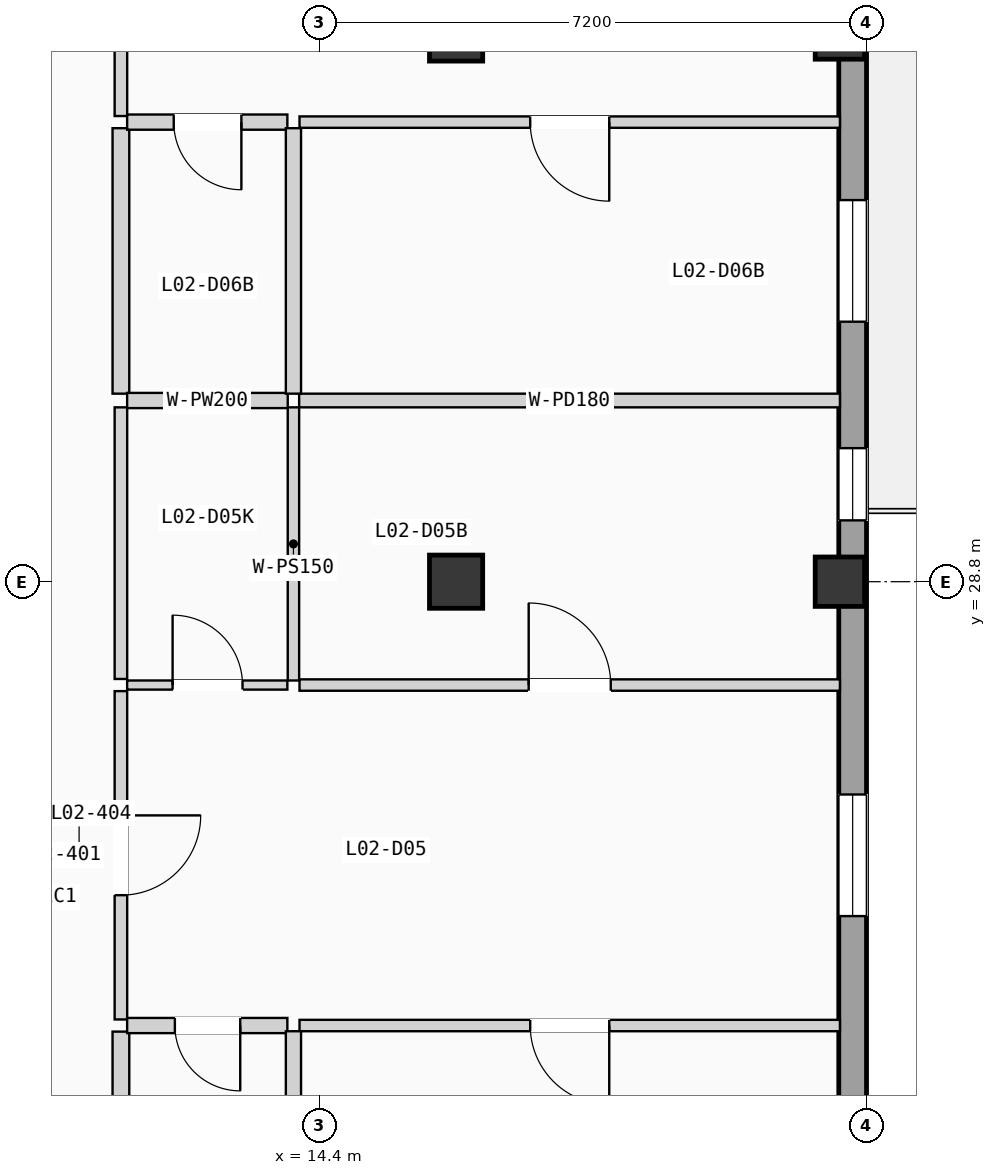
"""IFC4 building model, lengths in metres.
Left out: names, types, materials, properties, quantities, classifications, styles, units other than length and angle.
Written with IfcOpenShell. Run it as: python <this file> out.ifc"""

import sys

from ifc_helpers import new_model, si_unit, direction, frame, frame_2d, origin, origin_2d, place, context, subcontext, project, spatial, rectangle, extrude, element, fill, save


model = new_model("IFC4")
c1 = context("Model", 3, precision=1e-05, world=origin(), true_north=direction((0.0, 1.0)))
c2 = subcontext(c1, "Body", "Model", "MODEL_VIEW")
j1 = project(units=[si_unit("LENGTHUNIT", "METRE"), si_unit("PLANEANGLEUNIT", "RADIAN")], contexts=[c1])
p1 = place(None, origin())
s1 = spatial("IfcSite", under=j1, at=p1, CompositionType="ELEMENT")
p2 = place(p1, origin())
s2 = spatial("IfcBuilding", under=s1, at=p2, CompositionType="ELEMENT")
p3 = place(p2, frame((0.0, 0.0, 8.575)))
s3 = spatial("IfcBuildingStorey", under=s2, at=p3, CompositionType="ELEMENT", Elevation=8.575)
for number, where, z_axis, x_axis in (
    (1, (16.2, 28.8, 0.0), (0.0, 0.0, 1.0), (1.0, 0.0, 0.0)),
    (2, (16.2, 36.0, 0.0), (0.0, 0.0, 1.0), (1.0, 0.0, 0.0)),
):
    element("IfcColumn", number, at=place(p3, frame(where, z_axis=z_axis, x_axis=x_axis)), inside=s3, PredefinedType="COLUMN", context=c2, shape_type="SweptSolid", body=[
        extrude(rectangle(XDim=0.7, YDim=0.7, at=origin_2d()), origin(), (0.0, 0.0, 1.0), 3.5),
    ])
for number, where, z_axis, x_axis in (
    (3, (21.25, 28.8, 0.0), (0.0, 0.0, 1.0), (1.0, 0.0, 0.0)),
    (4, (21.25, 36.0, 0.0), (0.0, 0.0, 1.0), (1.0, 0.0, 0.0)),
):
    element("IfcColumn", number, at=place(p3, frame(where, z_axis=z_axis, x_axis=x_axis)), inside=s3, PredefinedType="COLUMN", context=c2, shape_type="SweptSolid", body=[
        extrude(rectangle(XDim=0.65, YDim=0.65, at=origin_2d()), origin(), (0.0, 0.0, 1.0), 3.5),
    ])
p4 = place(p3, frame((21.417, 0.365, 0.0), z_axis=(0.0, 0.0, 1.0), x_axis=(0.0, 1.0, 0.0)))
e5 = element("IfcWall", 5, at=p4, inside=s3, PredefinedType="SOLIDWALL", context=c2, shape_type="SweptSolid", body=[
    extrude(rectangle(XDim=49.67, YDim=0.365, at=frame_2d((24.835, 0.0))), origin(), (0.0, 0.0, 1.0), 3.24),
])
p5 = place(p4, frame((11.436, 0.0, 0.0)))
e6 = element("IfcOpeningElement", 6, at=p5, cuts=e5, PredefinedType="OPENING", context=c2, shape_type="SweptSolid", body=[
    extrude(rectangle(XDim=0.95, YDim=2.15, at=frame_2d((0.475, 1.075))), frame((0.0, 0.192, 0.0), z_axis=(0.0, -1.0, 0.0), x_axis=(1.0, 0.0, 0.0)), (0.0, 0.0, 1.0), 0.385),
])
p6 = place(p4, frame((8.241, 0.0, 0.9)))
e7 = element("IfcOpeningElement", 7, at=p6, cuts=e5, PredefinedType="OPENING", context=c2, shape_type="SweptSolid", body=[
    extrude(rectangle(XDim=1.48, YDim=1.65, at=frame_2d((0.74, 0.825))), frame((0.0, 0.192, 0.0), z_axis=(0.0, -1.0, 0.0), x_axis=(1.0, 0.0, 0.0)), (0.0, 0.0, 1.0), 0.385),
])
p7 = place(p4, frame((16.275, 0.0, 0.755)))
e8 = element("IfcOpeningElement", 8, at=p7, cuts=e5, PredefinedType="OPENING", context=c2, shape_type="SweptSolid", body=[
    extrude(rectangle(XDim=1.48, YDim=1.8, at=frame_2d((0.74, 0.9))), frame((0.0, 0.192, 0.0), z_axis=(0.0, -1.0, 0.0), x_axis=(1.0, 0.0, 0.0)), (0.0, 0.0, 1.0), 0.385),
])
p8 = place(p4, frame((24.035, 0.0, 0.9)))
e9 = element("IfcOpeningElement", 9, at=p8, cuts=e5, PredefinedType="OPENING", context=c2, shape_type="SweptSolid", body=[
    extrude(rectangle(XDim=1.6, YDim=1.2, at=frame_2d((0.8, 0.6))), frame((0.0, 0.192, 0.0), z_axis=(0.0, -1.0, 0.0), x_axis=(1.0, 0.0, 0.0)), (0.0, 0.0, 1.0), 0.385),
])
p9 = place(p4, frame((19.478, 0.0, 0.85)))
e10 = element("IfcOpeningElement", 10, at=p9, cuts=e5, PredefinedType="OPENING", context=c2, shape_type="SweptSolid", body=[
    extrude(rectangle(XDim=0.95, YDim=1.2, at=frame_2d((0.475, 0.6))), frame((0.0, 0.192, 0.0), z_axis=(0.0, -1.0, 0.0), x_axis=(1.0, 0.0, 0.0)), (0.0, 0.0, 1.0), 0.385),
])
p10 = place(p4, frame((29.242, 0.0, 0.85)))
e11 = element("IfcOpeningElement", 11, at=p10, cuts=e5, PredefinedType="OPENING", context=c2, shape_type="SweptSolid", body=[
    extrude(rectangle(XDim=0.95, YDim=1.2, at=frame_2d((0.475, 0.6))), frame((0.0, 0.192, 0.0), z_axis=(0.0, -1.0, 0.0), x_axis=(1.0, 0.0, 0.0)), (0.0, 0.0, 1.0), 0.385),
])
p11 = place(p4, frame((37.218, 0.0, 0.0)))
e12 = element("IfcOpeningElement", 12, at=p11, cuts=e5, PredefinedType="OPENING", context=c2, shape_type="SweptSolid", body=[
    extrude(rectangle(XDim=1.08, YDim=2.18, at=frame_2d((0.54, 1.09))), frame((0.0, 0.192, 0.0), z_axis=(0.0, -1.0, 0.0), x_axis=(1.0, 0.0, 0.0)), (0.0, 0.0, 1.0), 0.385),
])
p12 = place(p4, frame((31.856, 0.0, 0.9)))
e13 = element("IfcOpeningElement", 13, at=p12, cuts=e5, PredefinedType="OPENING", context=c2, shape_type="SweptSolid", body=[
    extrude(rectangle(XDim=1.6, YDim=1.65, at=frame_2d((0.8, 0.825))), frame((0.0, 0.192, 0.0), z_axis=(0.0, -1.0, 0.0), x_axis=(1.0, 0.0, 0.0)), (0.0, 0.0, 1.0), 0.385),
])
p13 = place(p4, frame((39.889, 0.0, 0.755)))
e14 = element("IfcOpeningElement", 14, at=p13, cuts=e5, PredefinedType="OPENING", context=c2, shape_type="SweptSolid", body=[
    extrude(rectangle(XDim=1.6, YDim=1.8, at=frame_2d((0.8, 0.9))), frame((0.0, 0.192, 0.0), z_axis=(0.0, -1.0, 0.0), x_axis=(1.0, 0.0, 0.0)), (0.0, 0.0, 1.0), 0.385),
])
p14 = place(p3, frame((11.79, 23.04, 0.0), z_axis=(0.0, 0.0, 1.0), x_axis=(0.0, 1.0, 0.0)))
e15 = element("IfcWall", 15, at=p14, inside=s3, PredefinedType="PARTITIONING", context=c2, shape_type="SweptSolid", body=[
    extrude(rectangle(XDim=4.32, YDim=0.165, at=frame_2d((2.16, 0.0))), origin(), (0.0, 0.0, 1.0), 3.22),
])
p15 = place(p14, frame((1.635, 0.0, 0.0)))
e16 = element("IfcOpeningElement", 16, at=p15, cuts=e15, PredefinedType="OPENING", context=c2, shape_type="SweptSolid", body=[
    extrude(rectangle(XDim=1.05, YDim=2.13, at=frame_2d((0.525, 1.065))), frame((0.0, 0.093, 0.0), z_axis=(0.0, -1.0, 0.0), x_axis=(1.0, 0.0, 0.0)), (0.0, 0.0, 1.0), 0.185),
])
p16 = place(p3, frame((11.79, 19.306, 0.0), z_axis=(0.0, 0.0, 1.0), x_axis=(0.0, 1.0, 0.0)))
e17 = element("IfcWall", 17, at=p16, inside=s3, PredefinedType="PLUMBINGWALL", context=c2, shape_type="SweptSolid", body=[
    extrude(rectangle(XDim=3.574, YDim=0.22, at=frame_2d((1.787, 0.0))), origin(), (0.0, 0.0, 1.0), 3.22),
])
p17 = place(p3, frame((11.79, 27.52, 0.0), z_axis=(0.0, 0.0, 1.0), x_axis=(0.0, 1.0, 0.0)))
e18 = element("IfcWall", 18, at=p17, inside=s3, PredefinedType="PARTITIONING", context=c2, shape_type="SweptSolid", body=[
    extrude(rectangle(XDim=3.574, YDim=0.165, at=frame_2d((1.787, 0.0))), origin(), (0.0, 0.0, 1.0), 3.22),
])
p18 = place(p3, frame((11.79, 34.927, 0.0), z_axis=(0.0, 0.0, 1.0), x_axis=(0.0, 1.0, 0.0)))
e19 = element("IfcWall", 19, at=p18, inside=s3, PredefinedType="PARTITIONING", context=c2, shape_type="SweptSolid", body=[
    extrude(rectangle(XDim=4.22, YDim=0.165, at=frame_2d((2.11, 0.0))), origin(), (0.0, 0.0, 1.0), 3.22),
])
p19 = place(p18, frame((1.585, 0.0, 0.0)))
e20 = element("IfcOpeningElement", 20, at=p19, cuts=e19, PredefinedType="OPENING", context=c2, shape_type="SweptSolid", body=[
    extrude(rectangle(XDim=1.05, YDim=2.13, at=frame_2d((0.525, 1.065))), frame((0.0, 0.093, 0.0), z_axis=(0.0, -1.0, 0.0), x_axis=(1.0, 0.0, 0.0)), (0.0, 0.0, 1.0), 0.185),
])
p20 = place(p3, frame((11.79, 31.274, 0.0), z_axis=(0.0, 0.0, 1.0), x_axis=(0.0, 1.0, 0.0)))
e21 = element("IfcWall", 21, at=p20, inside=s3, PredefinedType="PLUMBINGWALL", context=c2, shape_type="SweptSolid", body=[
    extrude(rectangle(XDim=3.493, YDim=0.22, at=frame_2d((1.747, 0.0))), origin(), (0.0, 0.0, 1.0), 3.22),
])
p21 = place(p3, frame((11.872, 22.96, 0.0), z_axis=(0.0, 0.0, 1.0), x_axis=(1.0, 0.0, 0.0)))
e22 = element("IfcWall", 22, at=p21, inside=s3, PredefinedType="PLUMBINGWALL", context=c2, shape_type="SweptSolid", body=[
    extrude(rectangle(XDim=2.108, YDim=0.2, at=frame_2d((1.054, 0.0))), origin(), (0.0, 0.0, 1.0), 3.22),
])
p22 = place(p21, frame((0.628, 0.0, 0.0)))
e23 = element("IfcOpeningElement", 23, at=p22, cuts=e22, PredefinedType="OPENING", context=c2, shape_type="SweptSolid", body=[
    extrude(rectangle(XDim=0.86, YDim=2.0, at=frame_2d((0.43, 1.0))), frame((0.0, 0.11, 0.0), z_axis=(0.0, -1.0, 0.0), x_axis=(1.0, 0.0, 0.0)), (0.0, 0.0, 1.0), 0.22),
])
p23 = place(p3, frame((11.872, 27.44, 0.0), z_axis=(0.0, 0.0, 1.0), x_axis=(1.0, 0.0, 0.0)))
e24 = element("IfcWall", 24, at=p23, inside=s3, PredefinedType="PARTITIONING", context=c2, shape_type="SweptSolid", body=[
    extrude(rectangle(XDim=2.108, YDim=0.12, at=frame_2d((1.054, 0.0))), origin(), (0.0, 0.0, 1.0), 3.22),
])
p24 = place(p23, frame((0.598, 0.0, 0.0)))
e25 = element("IfcOpeningElement", 25, at=p24, cuts=e24, PredefinedType="OPENING", context=c2, shape_type="SweptSolid", body=[
    extrude(rectangle(XDim=0.92, YDim=2.02, at=frame_2d((0.46, 1.01))), frame((0.0, 0.07, 0.0), z_axis=(0.0, -1.0, 0.0), x_axis=(1.0, 0.0, 0.0)), (0.0, 0.0, 1.0), 0.14),
])
p25 = place(p3, frame((14.14, 22.96, 0.0), z_axis=(0.0, 0.0, 1.0), x_axis=(1.0, 0.0, 0.0)))
e26 = element("IfcWall", 26, at=p25, inside=s3, PredefinedType="PARTITIONING", context=c2, shape_type="SweptSolid", body=[
    extrude(rectangle(XDim=7.11, YDim=0.15, at=frame_2d((3.555, 0.0))), origin(), (0.0, 0.0, 1.0), 3.22),
])
p26 = place(p25, frame((3.035, 0.0, 0.0)))
e27 = element("IfcOpeningElement", 27, at=p26, cuts=e26, PredefinedType="OPENING", context=c2, shape_type="SweptSolid", body=[
    extrude(rectangle(XDim=1.04, YDim=2.08, at=frame_2d((0.52, 1.04))), frame((0.0, 0.085, 0.0), z_axis=(0.0, -1.0, 0.0), x_axis=(1.0, 0.0, 0.0)), (0.0, 0.0, 1.0), 0.17),
])
p27 = place(p3, frame((14.14, 27.44, 0.0), z_axis=(0.0, 0.0, 1.0), x_axis=(1.0, 0.0, 0.0)))
e28 = element("IfcWall", 28, at=p27, inside=s3, PredefinedType="PARTITIONING", context=c2, shape_type="SweptSolid", body=[
    extrude(rectangle(XDim=7.11, YDim=0.15, at=frame_2d((3.555, 0.0))), origin(), (0.0, 0.0, 1.0), 3.22),
])
p28 = place(p27, frame((3.015, 0.0, 0.0)))
e29 = element("IfcOpeningElement", 29, at=p28, cuts=e28, PredefinedType="OPENING", context=c2, shape_type="SweptSolid", body=[
    extrude(rectangle(XDim=1.08, YDim=2.1, at=frame_2d((0.54, 1.05))), frame((0.0, 0.085, 0.0), z_axis=(0.0, -1.0, 0.0), x_axis=(1.0, 0.0, 0.0)), (0.0, 0.0, 1.0), 0.17),
])
p29 = place(p3, frame((14.06, 19.306, 0.0), z_axis=(0.0, 0.0, 1.0), x_axis=(0.0, 1.0, 0.0)))
e30 = element("IfcWall", 30, at=p29, inside=s3, PredefinedType="PLUMBINGWALL", context=c2, shape_type="SweptSolid", body=[
    extrude(rectangle(XDim=3.579, YDim=0.2, at=frame_2d((1.79, 0.0))), origin(), (0.0, 0.0, 1.0), 3.22),
])
p30 = place(p3, frame((14.06, 27.5, 0.0), z_axis=(0.0, 0.0, 1.0), x_axis=(0.0, 1.0, 0.0)))
e31 = element("IfcWall", 31, at=p30, inside=s3, PredefinedType="PARTITIONING", context=c2, shape_type="SweptSolid", body=[
    extrude(rectangle(XDim=3.594, YDim=0.15, at=frame_2d((1.797, 0.0))), origin(), (0.0, 0.0, 1.0), 3.22),
])
p31 = place(p3, frame((11.872, 31.184, 0.0), z_axis=(0.0, 0.0, 1.0), x_axis=(1.0, 0.0, 0.0)))
e32 = element("IfcWall", 32, at=p31, inside=s3, PredefinedType="PLUMBINGWALL", context=c2, shape_type="SweptSolid", body=[
    extrude(rectangle(XDim=2.113, YDim=0.2, at=frame_2d((1.057, 0.0))), origin(), (0.0, 0.0, 1.0), 3.22),
])
p32 = place(p3, frame((14.135, 31.184, 0.0), z_axis=(0.0, 0.0, 1.0), x_axis=(1.0, 0.0, 0.0)))
e33 = element("IfcWall", 33, at=p32, inside=s3, PredefinedType="PARTITIONING", context=c2, shape_type="SweptSolid", body=[
    extrude(rectangle(XDim=7.115, YDim=0.18, at=frame_2d((3.558, 0.0))), origin(), (0.0, 0.0, 1.0), 3.22),
])
p33 = place(p3, frame((11.872, 34.847, 0.0), z_axis=(0.0, 0.0, 1.0), x_axis=(1.0, 0.0, 0.0)))
e34 = element("IfcWall", 34, at=p33, inside=s3, PredefinedType="PLUMBINGWALL", context=c2, shape_type="SweptSolid", body=[
    extrude(rectangle(XDim=2.108, YDim=0.2, at=frame_2d((1.054, 0.0))), origin(), (0.0, 0.0, 1.0), 3.22),
])
p34 = place(p33, frame((0.613, 0.0, 0.0)))
e35 = element("IfcOpeningElement", 35, at=p34, cuts=e34, PredefinedType="OPENING", context=c2, shape_type="SweptSolid", body=[
    extrude(rectangle(XDim=0.89, YDim=2.03, at=frame_2d((0.445, 1.015))), frame((0.0, 0.11, 0.0), z_axis=(0.0, -1.0, 0.0), x_axis=(1.0, 0.0, 0.0)), (0.0, 0.0, 1.0), 0.22),
])
p35 = place(p3, frame((14.14, 34.847, 0.0), z_axis=(0.0, 0.0, 1.0), x_axis=(1.0, 0.0, 0.0)))
e36 = element("IfcWall", 36, at=p35, inside=s3, PredefinedType="PARTITIONING", context=c2, shape_type="SweptSolid", body=[
    extrude(rectangle(XDim=7.11, YDim=0.15, at=frame_2d((3.555, 0.0))), origin(), (0.0, 0.0, 1.0), 3.22),
])
p36 = place(p35, frame((3.035, 0.0, 0.0)))
e37 = element("IfcOpeningElement", 37, at=p36, cuts=e36, PredefinedType="OPENING", context=c2, shape_type="SweptSolid", body=[
    extrude(rectangle(XDim=1.04, YDim=2.08, at=frame_2d((0.52, 1.04))), frame((0.0, 0.085, 0.0), z_axis=(0.0, -1.0, 0.0), x_axis=(1.0, 0.0, 0.0)), (0.0, 0.0, 1.0), 0.17),
])
p37 = place(p3, frame((14.06, 31.274, 0.0), z_axis=(0.0, 0.0, 1.0), x_axis=(0.0, 1.0, 0.0)))
e38 = element("IfcWall", 38, at=p37, inside=s3, PredefinedType="PLUMBINGWALL", context=c2, shape_type="SweptSolid", body=[
    extrude(rectangle(XDim=3.493, YDim=0.2, at=frame_2d((1.747, 0.0))), origin(), (0.0, 0.0, 1.0), 3.22),
])
p38 = place(p8, origin())
e39 = element("IfcWindow", 39, at=p38, inside=s3, PartitioningType="DOUBLE_PANEL_VERTICAL", PredefinedType="WINDOW", context=c2, shape_type="SweptSolid", body=[
    extrude(rectangle(XDim=1.6, YDim=1.2, at=frame_2d((0.8, 0.6))), frame((0.0, 0.03, 0.0), z_axis=(0.0, -1.0, 0.0), x_axis=(1.0, 0.0, 0.0)), (0.0, 0.0, 1.0), 0.06),
])
fill(e9, e39)
p39 = place(p10, origin())
e40 = element("IfcWindow", 40, at=p39, inside=s3, PartitioningType="SINGLE_PANEL", PredefinedType="WINDOW", context=c2, shape_type="SweptSolid", body=[
    extrude(rectangle(XDim=0.95, YDim=1.2, at=frame_2d((0.475, 0.6))), frame((0.0, 0.03, 0.0), z_axis=(0.0, -1.0, 0.0), x_axis=(1.0, 0.0, 0.0)), (0.0, 0.0, 1.0), 0.06),
])
fill(e11, e40)
p40 = place(p12, origin())
e41 = element("IfcWindow", 41, at=p40, inside=s3, PartitioningType="DOUBLE_PANEL_VERTICAL", PredefinedType="WINDOW", context=c2, shape_type="SweptSolid", body=[
    extrude(rectangle(XDim=1.6, YDim=1.65, at=frame_2d((0.8, 0.825))), frame((0.0, 0.03, 0.0), z_axis=(0.0, -1.0, 0.0), x_axis=(1.0, 0.0, 0.0)), (0.0, 0.0, 1.0), 0.06),
])
fill(e13, e41)
p41 = place(p15, frame((1.05, 0.0, 0.0), z_axis=(0.0, 0.0, 1.0), x_axis=(-1.0, 0.0, 0.0)))
e42 = element("IfcDoor", 42, at=p41, inside=s3, OperationType="SINGLE_SWING_RIGHT", PredefinedType="DOOR", context=c2, shape_type="SweptSolid", body=[
    extrude(rectangle(XDim=1.05, YDim=2.13, at=frame_2d((0.525, 1.065))), frame((0.0, 0.025, 0.0), z_axis=(0.0, -1.0, 0.0), x_axis=(1.0, 0.0, 0.0)), (0.0, 0.0, 1.0), 0.05),
])
fill(e16, e42)
p42 = place(p22, frame((0.86, 0.0, 0.0), z_axis=(0.0, 0.0, 1.0), x_axis=(-1.0, 0.0, 0.0)))
e43 = element("IfcDoor", 43, at=p42, inside=s3, OperationType="SINGLE_SWING_RIGHT", PredefinedType="DOOR", context=c2, shape_type="SweptSolid", body=[
    extrude(rectangle(XDim=0.86, YDim=2.0, at=frame_2d((0.43, 1.0))), frame((0.0, 0.025, 0.0), z_axis=(0.0, -1.0, 0.0), x_axis=(1.0, 0.0, 0.0)), (0.0, 0.0, 1.0), 0.05),
])
fill(e23, e43)
p43 = place(p24, origin())
e44 = element("IfcDoor", 44, at=p43, inside=s3, OperationType="SINGLE_SWING_LEFT", PredefinedType="DOOR", context=c2, shape_type="SweptSolid", body=[
    extrude(rectangle(XDim=0.92, YDim=2.02, at=frame_2d((0.46, 1.01))), frame((0.0, 0.025, 0.0), z_axis=(0.0, -1.0, 0.0), x_axis=(1.0, 0.0, 0.0)), (0.0, 0.0, 1.0), 0.05),
])
fill(e25, e44)
p44 = place(p26, frame((1.04, 0.0, 0.0), z_axis=(0.0, 0.0, 1.0), x_axis=(-1.0, 0.0, 0.0)))
e45 = element("IfcDoor", 45, at=p44, inside=s3, OperationType="SINGLE_SWING_RIGHT", PredefinedType="DOOR", context=c2, shape_type="SweptSolid", body=[
    extrude(rectangle(XDim=1.04, YDim=2.08, at=frame_2d((0.52, 1.04))), frame((0.0, 0.025, 0.0), z_axis=(0.0, -1.0, 0.0), x_axis=(1.0, 0.0, 0.0)), (0.0, 0.0, 1.0), 0.05),
])
fill(e27, e45)
p45 = place(p28, origin())
e46 = element("IfcDoor", 46, at=p45, inside=s3, OperationType="SINGLE_SWING_LEFT", PredefinedType="DOOR", context=c2, shape_type="SweptSolid", body=[
    extrude(rectangle(XDim=1.08, YDim=2.1, at=frame_2d((0.54, 1.05))), frame((0.0, 0.025, 0.0), z_axis=(0.0, -1.0, 0.0), x_axis=(1.0, 0.0, 0.0)), (0.0, 0.0, 1.0), 0.05),
])
fill(e29, e46)
p46 = place(p34, frame((0.89, 0.0, 0.0), z_axis=(0.0, 0.0, 1.0), x_axis=(-1.0, 0.0, 0.0)))
e47 = element("IfcDoor", 47, at=p46, inside=s3, OperationType="SINGLE_SWING_RIGHT", PredefinedType="DOOR", context=c2, shape_type="SweptSolid", body=[
    extrude(rectangle(XDim=0.89, YDim=2.03, at=frame_2d((0.445, 1.015))), frame((0.0, 0.025, 0.0), z_axis=(0.0, -1.0, 0.0), x_axis=(1.0, 0.0, 0.0)), (0.0, 0.0, 1.0), 0.05),
])
fill(e35, e47)
p47 = place(p36, frame((1.04, 0.0, 0.0), z_axis=(0.0, 0.0, 1.0), x_axis=(-1.0, 0.0, 0.0)))
e48 = element("IfcDoor", 48, at=p47, inside=s3, OperationType="SINGLE_SWING_RIGHT", PredefinedType="DOOR", context=c2, shape_type="SweptSolid", body=[
    extrude(rectangle(XDim=1.04, YDim=2.08, at=frame_2d((0.52, 1.04))), frame((0.0, 0.025, 0.0), z_axis=(0.0, -1.0, 0.0), x_axis=(1.0, 0.0, 0.0)), (0.0, 0.0, 1.0), 0.05),
])
fill(e37, e48)
save(model, sys.argv[1])
